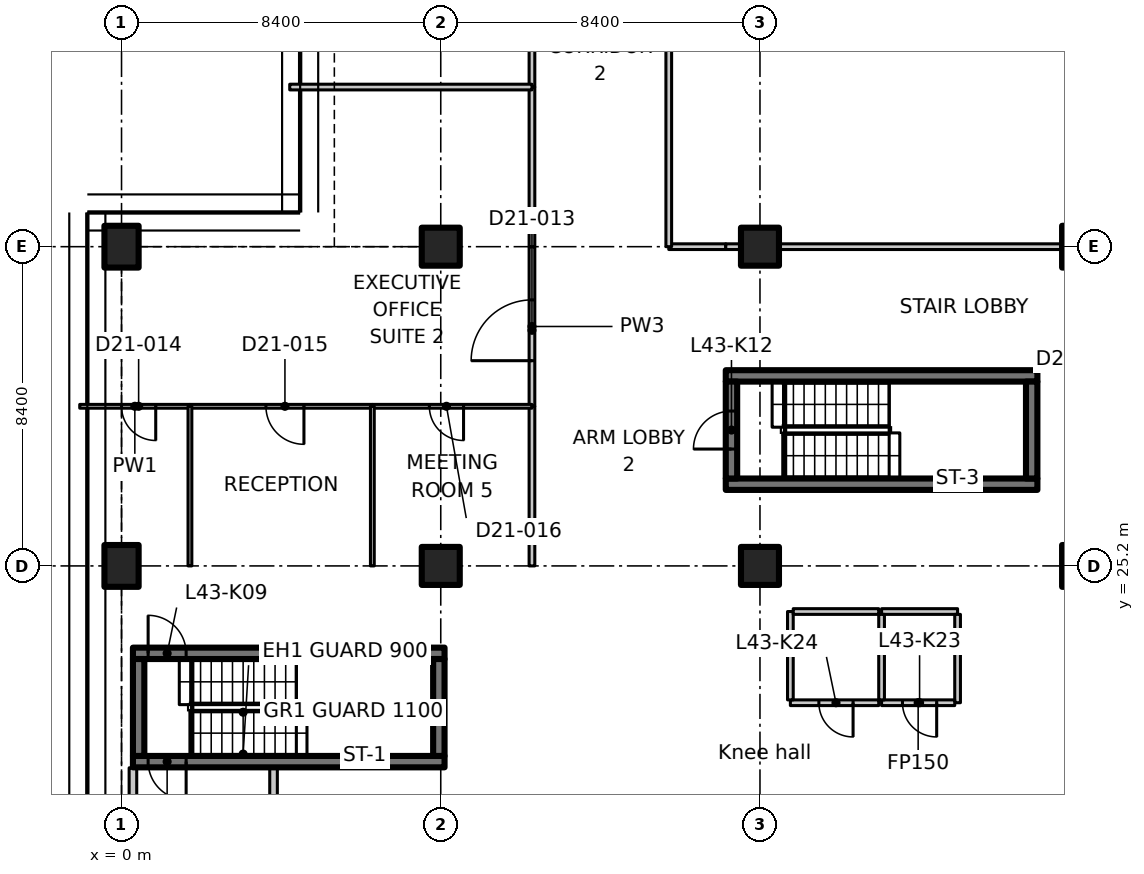
"""IFC4 building model, lengths in metres.
Left out: names, types, materials, properties, quantities, classifications, styles, units other than length and angle.
Written with IfcOpenShell. Run it as: python <this file> out.ifc"""

import sys

from ifc_helpers import new_model, si_unit, direction, frame, frame_2d, origin, origin_2d, place, context, subcontext, project, spatial, polyline, rectangle, outline, extrude, element, fill, save


model = new_model("IFC4")
c1 = context("Model", 3, precision=1e-05, world=origin(), true_north=direction((0.0, 1.0)))
c2 = subcontext(c1, "Body", "Model", "MODEL_VIEW")
j1 = project(units=[si_unit("LENGTHUNIT", "METRE"), si_unit("PLANEANGLEUNIT", "RADIAN")], contexts=[c1])
p1 = place(None, origin())
s1 = spatial("IfcSite", under=j1, at=p1, CompositionType="ELEMENT")
p2 = place(p1, origin())
s2 = spatial("IfcBuilding", under=s1, at=p2, CompositionType="ELEMENT")
p3 = place(p2, frame((0.0, 0.0, 174.0)))
s3 = spatial("IfcBuildingStorey", under=s2, at=p3, CompositionType="ELEMENT", Elevation=174.0)
for number, where, z_axis, x_axis in (
    (1, (0.0, 25.2, 0.0), (0.0, 0.0, 1.0), (1.0, 0.0, 0.0)),
    (2, (0.0, 33.6, 0.0), (0.0, 0.0, 1.0), (1.0, 0.0, 0.0)),
):
    element("IfcColumn", number, at=place(p3, frame(where, z_axis=z_axis, x_axis=x_axis)), inside=s3, PredefinedType="COLUMN", context=c2, shape_type="SweptSolid", body=[
        extrude(rectangle(XDim=0.9, YDim=1.1, at=origin_2d()), origin(), (0.0, 0.0, 1.0), 3.35),
    ])
for number, where, z_axis, x_axis in (
    (3, (8.4, 25.2, 0.0), (0.0, 0.0, 1.0), (1.0, 0.0, 0.0)),
    (4, (8.4, 33.6, 0.0), (0.0, 0.0, 1.0), (1.0, 0.0, 0.0)),
    (5, (16.8, 25.2, 0.0), (0.0, 0.0, 1.0), (1.0, 0.0, 0.0)),
    (6, (16.8, 33.6, 0.0), (0.0, 0.0, 1.0), (1.0, 0.0, 0.0)),
):
    element("IfcColumn", number, at=place(p3, frame(where, z_axis=z_axis, x_axis=x_axis)), inside=s3, PredefinedType="COLUMN", context=c2, shape_type="SweptSolid", body=[
        extrude(rectangle(XDim=1.0, YDim=1.0, at=origin_2d()), origin(), (0.0, 0.0, 1.0), 3.35),
    ])
for number, where, z_axis, x_axis in (
    (7, (25.2, 25.2, 0.0), (0.0, 0.0, 1.0), (1.0, 0.0, 0.0)),
    (8, (25.2, 33.6, 0.0), (0.0, 0.0, 1.0), (1.0, 0.0, 0.0)),
):
    element("IfcColumn", number, at=place(p3, frame(where, z_axis=z_axis, x_axis=x_axis)), inside=s3, PredefinedType="COLUMN", context=c2, shape_type="SweptSolid", body=[
        extrude(rectangle(XDim=0.9, YDim=1.1, at=origin_2d()), origin(), (0.0, 0.0, 1.0), 3.35),
    ])
p4 = place(p3, frame((8.5, 20.05, 0.0), z_axis=(0.0, 0.0, 1.0), x_axis=(-1.0, 0.0, 0.0)))
e9 = element("IfcWall", 9, at=p4, inside=s3, PredefinedType="SHEAR", context=c2, shape_type="SweptSolid", body=[
    extrude(rectangle(XDim=8.2, YDim=0.3, at=frame_2d((4.1, 0.0))), origin(), (0.0, 0.0, 1.0), 3.35),
])
p5 = place(p4, frame((6.8, 0.0, 0.0)))
e10 = element("IfcOpeningElement", 10, at=p5, cuts=e9, PredefinedType="OPENING", context=c2, shape_type="SweptSolid", body=[
    extrude(rectangle(XDim=1.0, YDim=2.1, at=frame_2d((0.5, 1.05))), frame((0.0, 0.16, 0.0), z_axis=(0.0, -1.0, 0.0), x_axis=(1.0, 0.0, 0.0)), (0.0, 0.0, 1.0), 0.32),
])
p6 = place(p3, frame((0.3, 22.9, 0.0), z_axis=(0.0, 0.0, 1.0), x_axis=(1.0, 0.0, 0.0)))
e11 = element("IfcWall", 11, at=p6, inside=s3, PredefinedType="SHEAR", context=c2, shape_type="SweptSolid", body=[
    extrude(rectangle(XDim=8.2, YDim=0.3, at=frame_2d((4.1, 0.0))), origin(), (0.0, 0.0, 1.0), 3.35),
])
p7 = place(p6, frame((0.4, 0.0, 0.0)))
e12 = element("IfcOpeningElement", 12, at=p7, cuts=e11, PredefinedType="OPENING", context=c2, shape_type="SweptSolid", body=[
    extrude(rectangle(XDim=1.0, YDim=2.1, at=frame_2d((0.5, 1.05))), frame((0.0, 0.16, 0.0), z_axis=(0.0, -1.0, 0.0), x_axis=(1.0, 0.0, 0.0)), (0.0, 0.0, 1.0), 0.32),
])
for number, where, z_axis, x_axis in (
    (13, (0.45, 20.2, 0.0), (0.0, 0.0, 1.0), (0.0, 1.0, 0.0)),
    (14, (8.35, 20.2, 0.0), (0.0, 0.0, 1.0), (0.0, 1.0, 0.0)),
):
    element("IfcWall", number, at=place(p3, frame(where, z_axis=z_axis, x_axis=x_axis)), inside=s3, PredefinedType="SHEAR", context=c2, shape_type="SweptSolid", body=[
        extrude(rectangle(XDim=2.55, YDim=0.3, at=frame_2d((1.275, 0.0))), origin(), (0.0, 0.0, 1.0), 3.35),
    ])
for number, where, z_axis, x_axis in (
    (15, (15.9, 27.35, 0.0), (0.0, 0.0, 1.0), (1.0, 0.0, 0.0)),
    (16, (15.9, 30.2, 0.0), (0.0, 0.0, 1.0), (1.0, 0.0, 0.0)),
):
    element("IfcWall", number, at=place(p3, frame(where, z_axis=z_axis, x_axis=x_axis)), inside=s3, PredefinedType="SHEAR", context=c2, shape_type="SweptSolid", body=[
        extrude(rectangle(XDim=8.2, YDim=0.3, at=frame_2d((4.1, 0.0))), origin(), (0.0, 0.0, 1.0), 3.35),
    ])
p8 = place(p3, frame((16.05, 27.5, 0.0), z_axis=(0.0, 0.0, 1.0), x_axis=(0.0, 1.0, 0.0)))
e17 = element("IfcWall", 17, at=p8, inside=s3, PredefinedType="SHEAR", context=c2, shape_type="SweptSolid", body=[
    extrude(rectangle(XDim=2.55, YDim=0.3, at=frame_2d((1.275, 0.0))), origin(), (0.0, 0.0, 1.0), 3.35),
])
p9 = place(p8, frame((0.775, 0.0, 0.0)))
e18 = element("IfcOpeningElement", 18, at=p9, cuts=e17, PredefinedType="OPENING", context=c2, shape_type="SweptSolid", body=[
    extrude(rectangle(XDim=1.0, YDim=2.1, at=frame_2d((0.5, 1.05))), frame((0.0, 0.16, 0.0), z_axis=(0.0, -1.0, 0.0), x_axis=(1.0, 0.0, 0.0)), (0.0, 0.0, 1.0), 0.32),
])
p10 = place(p3, frame((23.95, 27.5, 0.0), z_axis=(0.0, 0.0, 1.0), x_axis=(0.0, 1.0, 0.0)))
e19 = element("IfcWall", 19, at=p10, inside=s3, PredefinedType="SHEAR", context=c2, shape_type="SweptSolid", body=[
    extrude(rectangle(XDim=2.55, YDim=0.3, at=frame_2d((1.275, 0.0))), origin(), (0.0, 0.0, 1.0), 3.35),
])
p11 = place(p3, frame((0.3, 16.812, 0.0), z_axis=(0.0, 0.0, 1.0), x_axis=(0.0, 1.0, 0.0)))
e20 = element("IfcWall", 20, at=p11, inside=s3, PredefinedType="PARTITIONING", context=c2, shape_type="SweptSolid", body=[
    extrude(rectangle(XDim=3.076, YDim=0.2, at=frame_2d((1.538, 0.0))), origin(), (0.0, 0.0, 1.0), 2.98),
])
p12 = place(p3, frame((4.0, 19.888, 0.0), z_axis=(0.0, 0.0, 1.0), x_axis=(0.0, -1.0, 0.0)))
e21 = element("IfcWall", 21, at=p12, inside=s3, PredefinedType="PARTITIONING", context=c2, shape_type="SweptSolid", body=[
    extrude(rectangle(XDim=3.076, YDim=0.2, at=frame_2d((1.538, 0.0))), origin(), (0.0, 0.0, 1.0), 3.35),
])
p13 = place(p12, frame((1.488, 0.0, 0.0)))
e22 = element("IfcOpeningElement", 22, at=p13, cuts=e21, PredefinedType="OPENING", context=c2, shape_type="SweptSolid", body=[
    extrude(rectangle(XDim=1.0, YDim=2.1, at=frame_2d((0.5, 1.05))), frame((0.0, 0.11, 0.0), z_axis=(0.0, -1.0, 0.0), x_axis=(1.0, 0.0, 0.0)), (0.0, 0.0, 1.0), 0.22),
])
p14 = place(p3, frame((20.0, 24.0, 0.0), z_axis=(0.0, 0.0, 1.0), x_axis=(1.0, 0.0, 0.0)))
e23 = element("IfcWall", 23, at=p14, inside=s3, PredefinedType="PARTITIONING", context=c2, shape_type="SweptSolid", body=[
    extrude(rectangle(XDim=2.0, YDim=0.15, at=frame_2d((1.0, 0.0))), origin(), (0.0, 0.0, 1.0), 3.35),
])
p15 = place(p3, frame((22.0, 23.925, 0.0), z_axis=(0.0, 0.0, 1.0), x_axis=(0.0, -1.0, 0.0)))
e24 = element("IfcWall", 24, at=p15, inside=s3, PredefinedType="PARTITIONING", context=c2, shape_type="SweptSolid", body=[
    extrude(rectangle(XDim=2.325, YDim=0.15, at=frame_2d((1.163, 0.0))), origin(), (0.0, 0.0, 1.0), 3.35),
])
p16 = place(p3, frame((21.925, 21.6, 0.0), z_axis=(0.0, 0.0, 1.0), x_axis=(-1.0, 0.0, 0.0)))
e25 = element("IfcWall", 25, at=p16, inside=s3, PredefinedType="PARTITIONING", context=c2, shape_type="SweptSolid", body=[
    extrude(rectangle(XDim=1.925, YDim=0.15, at=frame_2d((0.962, 0.0))), origin(), (0.0, 0.0, 1.0), 3.35),
])
p17 = place(p16, frame((0.475, 0.0, 0.0)))
e26 = element("IfcOpeningElement", 26, at=p17, cuts=e25, PredefinedType="OPENING", context=c2, shape_type="SweptSolid", body=[
    extrude(rectangle(XDim=0.9, YDim=2.1, at=frame_2d((0.45, 1.05))), frame((0.0, 0.085, 0.0), z_axis=(0.0, -1.0, 0.0), x_axis=(1.0, 0.0, 0.0)), (0.0, 0.0, 1.0), 0.17),
])
p18 = place(p3, frame((20.0, 21.675, 0.0), z_axis=(0.0, 0.0, 1.0), x_axis=(0.0, 1.0, 0.0)))
e27 = element("IfcWall", 27, at=p18, inside=s3, PredefinedType="PARTITIONING", context=c2, shape_type="SweptSolid", body=[
    extrude(rectangle(XDim=2.25, YDim=0.15, at=frame_2d((1.125, 0.0))), origin(), (0.0, 0.0, 1.0), 3.35),
])
p19 = place(p3, frame((19.925, 21.6, 0.0), z_axis=(0.0, 0.0, 1.0), x_axis=(-1.0, 0.0, 0.0)))
e28 = element("IfcWall", 28, at=p19, inside=s3, PredefinedType="PARTITIONING", context=c2, shape_type="SweptSolid", body=[
    extrude(rectangle(XDim=2.325, YDim=0.15, at=frame_2d((1.163, 0.0))), origin(), (0.0, 0.0, 1.0), 3.35),
])
p20 = place(p19, frame((0.675, 0.0, 0.0)))
e29 = element("IfcOpeningElement", 29, at=p20, cuts=e28, PredefinedType="OPENING", context=c2, shape_type="SweptSolid", body=[
    extrude(rectangle(XDim=0.9, YDim=2.1, at=frame_2d((0.45, 1.05))), frame((0.0, 0.085, 0.0), z_axis=(0.0, -1.0, 0.0), x_axis=(1.0, 0.0, 0.0)), (0.0, 0.0, 1.0), 0.17),
])
p21 = place(p3, frame((17.6, 21.675, 0.0), z_axis=(0.0, 0.0, 1.0), x_axis=(0.0, 1.0, 0.0)))
e30 = element("IfcWall", 30, at=p21, inside=s3, PredefinedType="PARTITIONING", context=c2, shape_type="SweptSolid", body=[
    extrude(rectangle(XDim=2.325, YDim=0.15, at=frame_2d((1.163, 0.0))), origin(), (0.0, 0.0, 1.0), 3.35),
])
p22 = place(p3, frame((17.675, 24.0, 0.0), z_axis=(0.0, 0.0, 1.0), x_axis=(1.0, 0.0, 0.0)))
e31 = element("IfcWall", 31, at=p22, inside=s3, PredefinedType="PARTITIONING", context=c2, shape_type="SweptSolid", body=[
    extrude(rectangle(XDim=2.25, YDim=0.15, at=frame_2d((1.125, 0.0))), origin(), (0.0, 0.0, 1.0), 3.35),
])
p23 = place(p3, frame((10.8, 29.4, 0.0), z_axis=(0.0, 0.0, 1.0), x_axis=(0.0, 1.0, 0.0)))
e32 = element("IfcWall", 32, at=p23, inside=s3, PredefinedType="PARTITIONING", context=c2, shape_type="SweptSolid", body=[
    extrude(rectangle(XDim=4.2, YDim=0.15, at=frame_2d((2.1, 0.0))), origin(), (0.0, 0.0, 1.0), 3.33),
])
p24 = place(p23, frame((1.2, 0.0, 0.0)))
e33 = element("IfcOpeningElement", 33, at=p24, cuts=e32, PredefinedType="OPENING", context=c2, shape_type="SweptSolid", body=[
    extrude(rectangle(XDim=1.6, YDim=2.1, at=frame_2d((0.8, 1.05))), frame((0.0, 0.085, 0.0), z_axis=(0.0, -1.0, 0.0), x_axis=(1.0, 0.0, 0.0)), (0.0, 0.0, 1.0), 0.17),
])
p25 = place(p3, frame((10.8, 25.2, 0.0), z_axis=(0.0, 0.0, 1.0), x_axis=(0.0, 1.0, 0.0)))
e34 = element("IfcWall", 34, at=p25, inside=s3, PredefinedType="PARTITIONING", context=c2, shape_type="SweptSolid", body=[
    extrude(rectangle(XDim=4.2, YDim=0.15, at=frame_2d((2.1, 0.0))), origin(), (0.0, 0.0, 1.0), 3.33),
])
p26 = place(p3, frame((14.4, 33.6, 0.0), z_axis=(0.0, 0.0, 1.0), x_axis=(1.0, 0.0, 0.0)))
e35 = element("IfcWall", 35, at=p26, inside=s3, PredefinedType="PARTITIONING", context=c2, shape_type="SweptSolid", body=[
    extrude(rectangle(XDim=1.5, YDim=0.15, at=frame_2d((0.75, 0.0))), origin(), (0.0, 0.0, 1.0), 3.33),
])
p27 = place(p3, frame((15.9, 33.6, 0.0), z_axis=(0.0, 0.0, 1.0), x_axis=(1.0, 0.0, 0.0)))
e36 = element("IfcWall", 36, at=p27, inside=s3, PredefinedType="PARTITIONING", context=c2, shape_type="SweptSolid", body=[
    extrude(rectangle(XDim=0.38, YDim=0.15, at=frame_2d((0.19, 0.0))), origin(), (0.0, 0.0, 1.0), 3.33),
])
p28 = place(p3, frame((17.32, 33.6, 0.0), z_axis=(0.0, 0.0, 1.0), x_axis=(1.0, 0.0, 0.0)))
e37 = element("IfcWall", 37, at=p28, inside=s3, PredefinedType="PARTITIONING", context=c2, shape_type="SweptSolid", body=[
    extrude(rectangle(XDim=7.41, YDim=0.15, at=frame_2d((3.705, 0.0))), origin(), (0.0, 0.0, 1.0), 3.33),
])
p29 = place(p3, frame((10.8, 33.6, 0.0), z_axis=(0.0, 0.0, 1.0), x_axis=(0.0, 1.0, 0.0)))
e38 = element("IfcWall", 38, at=p29, inside=s3, PredefinedType="PARTITIONING", context=c2, shape_type="SweptSolid", body=[
    extrude(rectangle(XDim=4.2, YDim=0.15, at=frame_2d((2.1, 0.0))), origin(), (0.0, 0.0, 1.0), 3.33),
])
p30 = place(p3, frame((10.8, 37.8, 0.0), z_axis=(0.0, 0.0, 1.0), x_axis=(0.0, 1.0, 0.0)))
e39 = element("IfcWall", 39, at=p30, inside=s3, PredefinedType="PARTITIONING", context=c2, shape_type="SweptSolid", body=[
    extrude(rectangle(XDim=8.4, YDim=0.15, at=frame_2d((4.2, 0.0))), origin(), (0.0, 0.0, 1.0), 3.33),
])
p31 = place(p30, frame((3.6, 0.0, 0.0)))
e40 = element("IfcOpeningElement", 40, at=p31, cuts=e39, PredefinedType="OPENING", context=c2, shape_type="SweptSolid", body=[
    extrude(rectangle(XDim=1.1, YDim=2.1, at=frame_2d((0.55, 1.05))), frame((0.0, 0.085, 0.0), z_axis=(0.0, -1.0, 0.0), x_axis=(1.0, 0.0, 0.0)), (0.0, 0.0, 1.0), 0.17),
])
p32 = place(p3, frame((14.4, 51.625, 0.0), z_axis=(0.0, 0.0, 1.0), x_axis=(0.0, -1.0, 0.0)))
e41 = element("IfcWall", 41, at=p32, inside=s3, PredefinedType="PARTITIONING", context=c2, shape_type="SweptSolid", body=[
    extrude(outline(polyline([(0.0, 0.0), (18.025, 0.0), (18.025, 3.33), (1.675, 3.33), (1.673, 2.98), (0.777, 2.98), (0.775, 3.33), (0.145, 3.33), (0.0, 3.33), (0.0, 0.0)])), frame((0.0, 0.075, 0.0), z_axis=(0.0, -1.0, 0.0), x_axis=(1.0, 0.0, 0.0)), (0.0, 0.0, 1.0), 0.15),
])
p33 = place(p32, frame((8.145, 0.0, 0.0)))
e42 = element("IfcOpeningElement", 42, at=p33, cuts=e41, PredefinedType="OPENING", context=c2, shape_type="SweptSolid", body=[
    extrude(rectangle(XDim=2.0, YDim=2.4, at=frame_2d((1.0, 1.2))), frame((0.0, 0.085, 0.0), z_axis=(0.0, -1.0, 0.0), x_axis=(1.0, 0.0, 0.0)), (0.0, 0.0, 1.0), 0.17),
])
p34 = place(p3, frame((1.8, 29.4, 0.0), z_axis=(0.0, 0.0, 1.0), x_axis=(-1.0, 0.0, 0.0)))
e43 = element("IfcWall", 43, at=p34, inside=s3, PredefinedType="PARTITIONING", context=c2, shape_type="SweptSolid", body=[
    extrude(rectangle(XDim=2.9, YDim=0.1, at=frame_2d((1.45, 0.0))), origin(), (0.0, 0.0, 1.0), 2.98),
])
p35 = place(p34, frame((0.9, 0.0, 0.0)))
e44 = element("IfcOpeningElement", 44, at=p35, cuts=e43, PredefinedType="OPENING", context=c2, shape_type="SweptSolid", body=[
    extrude(rectangle(XDim=0.9, YDim=2.1, at=frame_2d((0.45, 1.05))), frame((0.0, 0.06, 0.0), z_axis=(0.0, -1.0, 0.0), x_axis=(1.0, 0.0, 0.0)), (0.0, 0.0, 1.0), 0.12),
])
p36 = place(p3, frame((6.6, 29.4, 0.0), z_axis=(0.0, 0.0, 1.0), x_axis=(-1.0, 0.0, 0.0)))
e45 = element("IfcWall", 45, at=p36, inside=s3, PredefinedType="PARTITIONING", context=c2, shape_type="SweptSolid", body=[
    extrude(rectangle(XDim=4.8, YDim=0.1, at=frame_2d((2.4, 0.0))), origin(), (0.0, 0.0, 1.0), 3.33),
])
p37 = place(p36, frame((1.8, 0.0, 0.0)))
e46 = element("IfcOpeningElement", 46, at=p37, cuts=e45, PredefinedType="OPENING", context=c2, shape_type="SweptSolid", body=[
    extrude(rectangle(XDim=1.0, YDim=2.1, at=frame_2d((0.5, 1.05))), frame((0.0, 0.06, 0.0), z_axis=(0.0, -1.0, 0.0), x_axis=(1.0, 0.0, 0.0)), (0.0, 0.0, 1.0), 0.12),
])
p38 = place(p3, frame((10.8, 29.4, 0.0), z_axis=(0.0, 0.0, 1.0), x_axis=(-1.0, 0.0, 0.0)))
e47 = element("IfcWall", 47, at=p38, inside=s3, PredefinedType="PARTITIONING", context=c2, shape_type="SweptSolid", body=[
    extrude(rectangle(XDim=4.2, YDim=0.1, at=frame_2d((2.1, 0.0))), origin(), (0.0, 0.0, 1.0), 3.33),
])
p39 = place(p38, frame((1.8, 0.0, 0.0)))
e48 = element("IfcOpeningElement", 48, at=p39, cuts=e47, PredefinedType="OPENING", context=c2, shape_type="SweptSolid", body=[
    extrude(rectangle(XDim=0.9, YDim=2.1, at=frame_2d((0.45, 1.05))), frame((0.0, 0.06, 0.0), z_axis=(0.0, -1.0, 0.0), x_axis=(1.0, 0.0, 0.0)), (0.0, 0.0, 1.0), 0.12),
])
p40 = place(p3, frame((4.426, 37.8, 0.0), z_axis=(0.0, 0.0, 1.0), x_axis=(1.0, 0.0, 0.0)))
e49 = element("IfcWall", 49, at=p40, inside=s3, PredefinedType="PARTITIONING", context=c2, shape_type="SweptSolid", body=[
    extrude(outline(polyline([(0.0, 0.0), (6.374, 0.0), (6.374, 3.33), (1.624, 3.33), (1.622, 2.98), (0.726, 2.98), (0.724, 3.33), (0.074, 3.33), (0.0, 3.33), (0.0, 0.0)])), frame((0.0, 0.075, 0.0), z_axis=(0.0, -1.0, 0.0), x_axis=(1.0, 0.0, 0.0)), (0.0, 0.0, 1.0), 0.15),
])
for number, where, z_axis, x_axis in (
    (50, (1.8, 29.4, 0.0), (0.0, 0.0, 1.0), (0.0, -1.0, 0.0)),
    (51, (6.6, 29.4, 0.0), (0.0, 0.0, 1.0), (0.0, -1.0, 0.0)),
):
    element("IfcWall", number, at=place(p3, frame(where, z_axis=z_axis, x_axis=x_axis)), inside=s3, PredefinedType="PARTITIONING", context=c2, shape_type="SweptSolid", body=[
        extrude(rectangle(XDim=4.2, YDim=0.1, at=frame_2d((2.1, 0.0))), origin(), (0.0, 0.0, 1.0), 3.33),
    ])
p41 = place(p5, origin())
e52 = element("IfcDoor", 52, at=p41, inside=s3, OperationType="SINGLE_SWING_RIGHT", PredefinedType="DOOR", context=c2, shape_type="SweptSolid", body=[
    extrude(rectangle(XDim=1.0, YDim=2.1, at=frame_2d((0.5, 1.05))), frame((0.0, 0.025, 0.0), z_axis=(0.0, -1.0, 0.0), x_axis=(1.0, 0.0, 0.0)), (0.0, 0.0, 1.0), 0.05),
])
fill(e10, e52)
p42 = place(p7, origin())
e53 = element("IfcDoor", 53, at=p42, inside=s3, OperationType="SINGLE_SWING_LEFT", PredefinedType="DOOR", context=c2, shape_type="SweptSolid", body=[
    extrude(rectangle(XDim=1.0, YDim=2.1, at=frame_2d((0.5, 1.05))), frame((0.0, 0.025, 0.0), z_axis=(0.0, -1.0, 0.0), x_axis=(1.0, 0.0, 0.0)), (0.0, 0.0, 1.0), 0.05),
])
fill(e12, e53)
p43 = place(p9, origin())
e54 = element("IfcDoor", 54, at=p43, inside=s3, OperationType="SINGLE_SWING_RIGHT", PredefinedType="DOOR", context=c2, shape_type="SweptSolid", body=[
    extrude(rectangle(XDim=1.0, YDim=2.1, at=frame_2d((0.5, 1.05))), frame((0.0, 0.025, 0.0), z_axis=(0.0, -1.0, 0.0), x_axis=(1.0, 0.0, 0.0)), (0.0, 0.0, 1.0), 0.05),
])
fill(e18, e54)
p44 = place(p17, origin())
e55 = element("IfcDoor", 55, at=p44, inside=s3, OperationType="SINGLE_SWING_LEFT", PredefinedType="DOOR", context=c2, shape_type="SweptSolid", body=[
    extrude(rectangle(XDim=0.9, YDim=2.1, at=frame_2d((0.45, 1.05))), frame((0.0, 0.025, 0.0), z_axis=(0.0, -1.0, 0.0), x_axis=(1.0, 0.0, 0.0)), (0.0, 0.0, 1.0), 0.05),
])
fill(e26, e55)
p45 = place(p20, origin())
e56 = element("IfcDoor", 56, at=p45, inside=s3, OperationType="SINGLE_SWING_RIGHT", PredefinedType="DOOR", context=c2, shape_type="SweptSolid", body=[
    extrude(rectangle(XDim=0.9, YDim=2.1, at=frame_2d((0.45, 1.05))), frame((0.0, 0.025, 0.0), z_axis=(0.0, -1.0, 0.0), x_axis=(1.0, 0.0, 0.0)), (0.0, 0.0, 1.0), 0.05),
])
fill(e29, e56)
p46 = place(p24, origin())
e57 = element("IfcDoor", 57, at=p46, inside=s3, OperationType="DOUBLE_DOOR_SINGLE_SWING", PredefinedType="DOOR", context=c2, shape_type="SweptSolid", body=[
    extrude(rectangle(XDim=1.6, YDim=2.1, at=frame_2d((0.8, 1.05))), frame((0.0, 0.025, 0.0), z_axis=(0.0, -1.0, 0.0), x_axis=(1.0, 0.0, 0.0)), (0.0, 0.0, 1.0), 0.05),
])
fill(e33, e57)
p47 = place(p35, origin())
e58 = element("IfcDoor", 58, at=p47, inside=s3, OperationType="SINGLE_SWING_LEFT", PredefinedType="DOOR", context=c2, shape_type="SweptSolid", body=[
    extrude(rectangle(XDim=0.9, YDim=2.1, at=frame_2d((0.45, 1.05))), frame((0.0, 0.025, 0.0), z_axis=(0.0, -1.0, 0.0), x_axis=(1.0, 0.0, 0.0)), (0.0, 0.0, 1.0), 0.05),
])
fill(e44, e58)
p48 = place(p37, origin())
e59 = element("IfcDoor", 59, at=p48, inside=s3, OperationType="SINGLE_SWING_LEFT", PredefinedType="DOOR", context=c2, shape_type="SweptSolid", body=[
    extrude(rectangle(XDim=1.0, YDim=2.1, at=frame_2d((0.5, 1.05))), frame((0.0, 0.025, 0.0), z_axis=(0.0, -1.0, 0.0), x_axis=(1.0, 0.0, 0.0)), (0.0, 0.0, 1.0), 0.05),
])
fill(e46, e59)
p49 = place(p39, origin())
e60 = element("IfcDoor", 60, at=p49, inside=s3, OperationType="SINGLE_SWING_LEFT", PredefinedType="DOOR", context=c2, shape_type="SweptSolid", body=[
    extrude(rectangle(XDim=0.9, YDim=2.1, at=frame_2d((0.45, 1.05))), frame((0.0, 0.025, 0.0), z_axis=(0.0, -1.0, 0.0), x_axis=(1.0, 0.0, 0.0)), (0.0, 0.0, 1.0), 0.05),
])
fill(e48, e60)
save(model, sys.argv[1])
